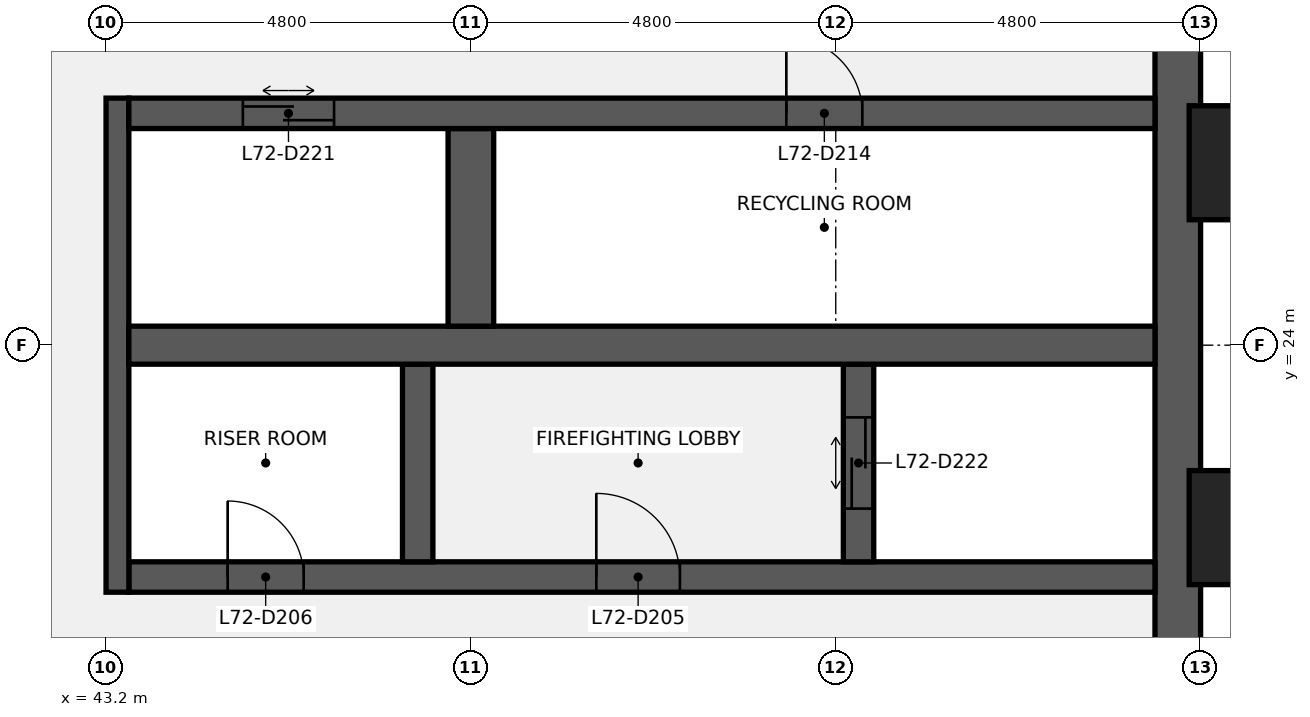
"""IFC4 building model, lengths in metres.
Left out: names, types, materials, properties, quantities, classifications, styles, units other than length and angle.
Written with IfcOpenShell. Run it as: python <this file> out.ifc"""

import sys

from ifc_helpers import new_model, si_unit, direction, frame, frame_2d, origin, origin_2d, place, context, subcontext, project, spatial, rectangle, extrude, element, fill, save


model = new_model("IFC4")
c1 = context("Model", 3, precision=1e-05, world=origin(), true_north=direction((0.0, 1.0)))
c2 = subcontext(c1, "Body", "Model", "MODEL_VIEW")
j1 = project(units=[si_unit("LENGTHUNIT", "METRE"), si_unit("PLANEANGLEUNIT", "RADIAN")], contexts=[c1])
p1 = place(None, origin())
s1 = spatial("IfcSite", under=j1, at=p1, CompositionType="ELEMENT")
p2 = place(p1, origin())
s2 = spatial("IfcBuilding", under=s1, at=p2, CompositionType="ELEMENT")
p3 = place(p2, frame((0.0, 0.0, 326.3)))
s3 = spatial("IfcBuildingStorey", under=s2, at=p3, CompositionType="ELEMENT", Elevation=326.3)
p4 = place(p3, frame((57.3, 38.4, 0.0), z_axis=(0.0, 0.0, 1.0), x_axis=(0.0, -1.0, 0.0)))
e1 = element("IfcWall", 1, at=p4, inside=s3, PredefinedType="SHEAR", context=c2, shape_type="SweptSolid", body=[
    extrude(rectangle(XDim=28.8, YDim=0.6, at=frame_2d((14.4, 0.0))), origin(), (0.0, 0.0, 1.0), 3.84),
])
p5 = place(p4, frame((18.45, 0.0, 0.9)))
e2 = element("IfcOpeningElement", 2, at=p5, cuts=e1, PredefinedType="OPENING", context=c2, shape_type="SweptSolid", body=[
    extrude(rectangle(XDim=1.5, YDim=1.5, at=frame_2d((0.75, 0.75))), frame((0.0, 0.31, 0.0), z_axis=(0.0, -1.0, 0.0), x_axis=(1.0, 0.0, 0.0)), (0.0, 0.0, 1.0), 0.62),
])
p6 = place(p4, frame((8.85, 0.0, 0.9)))
e3 = element("IfcOpeningElement", 3, at=p6, cuts=e1, PredefinedType="OPENING", context=c2, shape_type="SweptSolid", body=[
    extrude(rectangle(XDim=1.5, YDim=1.5, at=frame_2d((0.75, 0.75))), frame((0.0, 0.31, 0.0), z_axis=(0.0, -1.0, 0.0), x_axis=(1.0, 0.0, 0.0)), (0.0, 0.0, 1.0), 0.62),
])
p7 = place(p3, frame((43.5, 20.95, 0.0), z_axis=(0.0, 0.0, 1.0), x_axis=(1.0, 0.0, 0.0)))
e4 = element("IfcWall", 4, at=p7, inside=s3, PredefinedType="SHEAR", context=c2, shape_type="SweptSolid", body=[
    extrude(rectangle(XDim=13.5, YDim=0.4, at=frame_2d((6.75, 0.0))), origin(), (0.0, 0.0, 1.0), 3.84),
])
p8 = place(p7, frame((6.15, 0.0, 0.0)))
e5 = element("IfcOpeningElement", 5, at=p8, cuts=e4, PredefinedType="OPENING", context=c2, shape_type="SweptSolid", body=[
    extrude(rectangle(XDim=1.1, YDim=2.1, at=frame_2d((0.55, 1.05))), frame((0.0, 0.21, 0.0), z_axis=(0.0, -1.0, 0.0), x_axis=(1.0, 0.0, 0.0)), (0.0, 0.0, 1.0), 0.42),
])
p9 = place(p7, frame((1.3, 0.0, 0.0)))
e6 = element("IfcOpeningElement", 6, at=p9, cuts=e4, PredefinedType="OPENING", context=c2, shape_type="SweptSolid", body=[
    extrude(rectangle(XDim=1.0, YDim=2.1, at=frame_2d((0.5, 1.05))), frame((0.0, 0.21, 0.0), z_axis=(0.0, -1.0, 0.0), x_axis=(1.0, 0.0, 0.0)), (0.0, 0.0, 1.0), 0.42),
])
p10 = place(p3, frame((43.35, 20.75, 0.0), z_axis=(0.0, 0.0, 1.0), x_axis=(0.0, 1.0, 0.0)))
e7 = element("IfcWall", 7, at=p10, inside=s3, PredefinedType="SHEAR", context=c2, shape_type="SweptSolid", body=[
    extrude(rectangle(XDim=6.5, YDim=0.3, at=frame_2d((3.25, 0.0))), origin(), (0.0, 0.0, 1.0), 3.84),
])
p11 = place(p3, frame((53.1, 21.15, 0.0), z_axis=(0.0, 0.0, 1.0), x_axis=(0.0, 1.0, 0.0)))
e8 = element("IfcWall", 8, at=p11, inside=s3, PredefinedType="SHEAR", context=c2, shape_type="SweptSolid", body=[
    extrude(rectangle(XDim=2.6, YDim=0.4, at=frame_2d((1.3, 0.0))), origin(), (0.0, 0.0, 1.0), 3.84),
])
p12 = place(p11, frame((0.7, 0.0, 0.0)))
e9 = element("IfcOpeningElement", 9, at=p12, cuts=e8, PredefinedType="OPENING", context=c2, shape_type="SweptSolid", body=[
    extrude(rectangle(XDim=1.2, YDim=2.1, at=frame_2d((0.6, 1.05))), frame((0.0, 0.21, 0.0), z_axis=(0.0, -1.0, 0.0), x_axis=(1.0, 0.0, 0.0)), (0.0, 0.0, 1.0), 0.42),
])
p13 = place(p3, frame((47.3, 21.15, 0.0), z_axis=(0.0, 0.0, 1.0), x_axis=(0.0, 1.0, 0.0)))
e10 = element("IfcWall", 10, at=p13, inside=s3, PredefinedType="SHEAR", context=c2, shape_type="SweptSolid", body=[
    extrude(rectangle(XDim=2.6, YDim=0.4, at=frame_2d((1.3, 0.0))), origin(), (0.0, 0.0, 1.0), 3.84),
])
p14 = place(p3, frame((43.5, 24.0, 0.0), z_axis=(0.0, 0.0, 1.0), x_axis=(1.0, 0.0, 0.0)))
e11 = element("IfcWall", 11, at=p14, inside=s3, PredefinedType="SHEAR", context=c2, shape_type="SweptSolid", body=[
    extrude(rectangle(XDim=13.5, YDim=0.5, at=frame_2d((6.75, 0.0))), origin(), (0.0, 0.0, 1.0), 3.84),
])
p15 = place(p3, frame((48.0, 24.25, 0.0), z_axis=(0.0, 0.0, 1.0), x_axis=(0.0, 1.0, 0.0)))
e12 = element("IfcWall", 12, at=p15, inside=s3, PredefinedType="SHEAR", context=c2, shape_type="SweptSolid", body=[
    extrude(rectangle(XDim=2.6, YDim=0.6, at=frame_2d((1.3, 0.0))), origin(), (0.0, 0.0, 1.0), 3.84),
])
p16 = place(p3, frame((43.5, 27.05, 0.0), z_axis=(0.0, 0.0, 1.0), x_axis=(1.0, 0.0, 0.0)))
e13 = element("IfcWall", 13, at=p16, inside=s3, PredefinedType="SHEAR", context=c2, shape_type="SweptSolid", body=[
    extrude(rectangle(XDim=13.5, YDim=0.4, at=frame_2d((6.75, 0.0))), origin(), (0.0, 0.0, 1.0), 3.84),
])
p17 = place(p16, frame((8.65, 0.0, 0.0)))
e14 = element("IfcOpeningElement", 14, at=p17, cuts=e13, PredefinedType="OPENING", context=c2, shape_type="SweptSolid", body=[
    extrude(rectangle(XDim=1.0, YDim=2.1, at=frame_2d((0.5, 1.05))), frame((0.0, 0.21, 0.0), z_axis=(0.0, -1.0, 0.0), x_axis=(1.0, 0.0, 0.0)), (0.0, 0.0, 1.0), 0.42),
])
p18 = place(p16, frame((1.5, 0.0, 0.0)))
e15 = element("IfcOpeningElement", 15, at=p18, cuts=e13, PredefinedType="OPENING", context=c2, shape_type="SweptSolid", body=[
    extrude(rectangle(XDim=1.2, YDim=2.1, at=frame_2d((0.6, 1.05))), frame((0.0, 0.21, 0.0), z_axis=(0.0, -1.0, 0.0), x_axis=(1.0, 0.0, 0.0)), (0.0, 0.0, 1.0), 0.42),
])
for number, where, z_axis, x_axis in (
    (16, (58.35, 21.6, 0.0), (0.0, 0.0, 1.0), (0.0, 1.0, 0.0)),
    (17, (58.35, 26.4, 0.0), (0.0, 0.0, 1.0), (0.0, 1.0, 0.0)),
):
    element("IfcColumn", number, at=place(p3, frame(where, z_axis=z_axis, x_axis=x_axis)), inside=s3, PredefinedType="PILASTER", context=c2, shape_type="SweptSolid", body=[
        extrude(rectangle(XDim=1.8, YDim=1.5, at=origin_2d()), origin(), (0.0, 0.0, 1.0), 4.0),
    ])
p19 = place(p8, origin())
e18 = element("IfcDoor", 18, at=p19, inside=s3, OperationType="SINGLE_SWING_LEFT", PredefinedType="DOOR", context=c2, shape_type="SweptSolid", body=[
    extrude(rectangle(XDim=1.1, YDim=2.1, at=frame_2d((0.55, 1.05))), frame((0.0, 0.025, 0.0), z_axis=(0.0, -1.0, 0.0), x_axis=(1.0, 0.0, 0.0)), (0.0, 0.0, 1.0), 0.05),
])
fill(e5, e18)
p20 = place(p9, origin())
e19 = element("IfcDoor", 19, at=p20, inside=s3, OperationType="SINGLE_SWING_LEFT", PredefinedType="DOOR", context=c2, shape_type="SweptSolid", body=[
    extrude(rectangle(XDim=1.0, YDim=2.1, at=frame_2d((0.5, 1.05))), frame((0.0, 0.025, 0.0), z_axis=(0.0, -1.0, 0.0), x_axis=(1.0, 0.0, 0.0)), (0.0, 0.0, 1.0), 0.05),
])
fill(e6, e19)
p21 = place(p17, origin())
e20 = element("IfcDoor", 20, at=p21, inside=s3, OperationType="SINGLE_SWING_LEFT", PredefinedType="DOOR", context=c2, shape_type="SweptSolid", body=[
    extrude(rectangle(XDim=1.0, YDim=2.1, at=frame_2d((0.5, 1.05))), frame((0.0, 0.025, 0.0), z_axis=(0.0, -1.0, 0.0), x_axis=(1.0, 0.0, 0.0)), (0.0, 0.0, 1.0), 0.05),
])
fill(e14, e20)
p22 = place(p18, origin())
e21 = element("IfcDoor", 21, at=p22, inside=s3, OperationType="DOUBLE_DOOR_SLIDING", PredefinedType="DOOR", context=c2, shape_type="SweptSolid", body=[
    extrude(rectangle(XDim=1.2, YDim=2.1, at=frame_2d((0.6, 1.05))), frame((0.0, 0.025, 0.0), z_axis=(0.0, -1.0, 0.0), x_axis=(1.0, 0.0, 0.0)), (0.0, 0.0, 1.0), 0.05),
])
fill(e15, e21)
p23 = place(p12, origin())
e22 = element("IfcDoor", 22, at=p23, inside=s3, OperationType="DOUBLE_DOOR_SLIDING", PredefinedType="DOOR", context=c2, shape_type="SweptSolid", body=[
    extrude(rectangle(XDim=1.2, YDim=2.1, at=frame_2d((0.6, 1.05))), frame((0.0, 0.025, 0.0), z_axis=(0.0, -1.0, 0.0), x_axis=(1.0, 0.0, 0.0)), (0.0, 0.0, 1.0), 0.05),
])
fill(e9, e22)
save(model, sys.argv[1])
